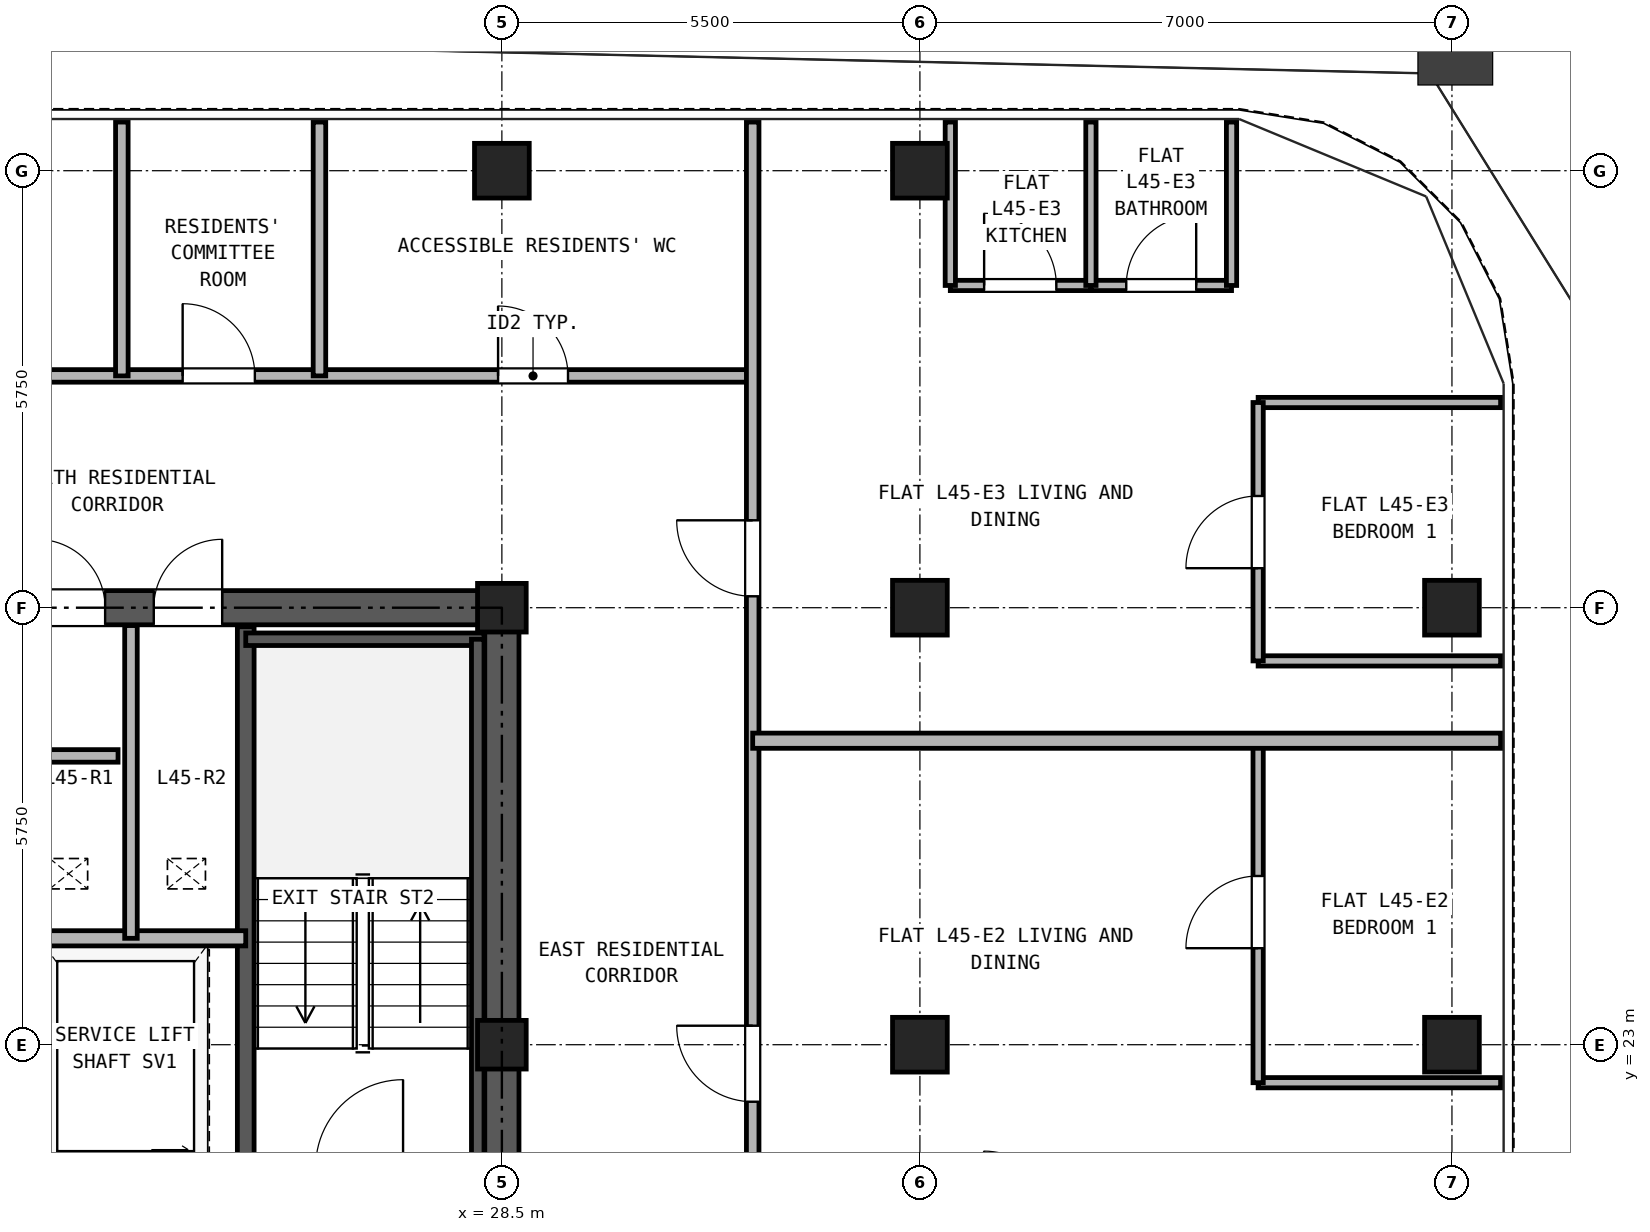
"""IFC4 building model, lengths in metres.
Left out: names, types, materials, properties, quantities, classifications, styles, units other than length and angle.
Written with IfcOpenShell. Run it as: python <this file> out.ifc"""

import sys

from ifc_helpers import new_model, si_unit, direction, frame, frame_2d, origin, origin_2d, place, context, subcontext, project, spatial, rectangle, hollow_rectangle, extrude, source, transform, mapped, element, fill, save


model = new_model("IFC4")
c1 = context("Model", 3, precision=1e-05, world=origin(), true_north=direction((0.0, 1.0)))
c2 = subcontext(c1, "Body", "Model", "MODEL_VIEW")
j1 = project(units=[si_unit("LENGTHUNIT", "METRE"), si_unit("PLANEANGLEUNIT", "RADIAN")], contexts=[c1])
p1 = place(None, origin())
s1 = spatial("IfcSite", under=j1, at=p1, CompositionType="ELEMENT")
p2 = place(p1, origin())
s2 = spatial("IfcBuilding", under=s1, at=p2, CompositionType="ELEMENT")
p3 = place(p2, frame((0.0, 0.0, 162.5)))
s3 = spatial("IfcBuildingStorey", under=s2, at=p3, CompositionType="ELEMENT", Elevation=162.5)
m1 = source(origin(), c2, "Body", "SweptSolid", [
    extrude(hollow_rectangle(XDim=0.72, YDim=0.72, WallThickness=0.04, at=origin_2d()), origin(), (0.0, 0.0, 1.0), 2.95),
])
for number, where, z_axis, x_axis in (
    (1, (28.5, 34.5, 0.0), (0.0, 0.0, 1.0), (1.0, 0.0, 0.0)),
    (2, (34.0, 34.5, 0.0), (0.0, 0.0, 1.0), (1.0, 0.0, 0.0)),
    (3, (41.0, 23.0, 0.0), (0.0, 0.0, 1.0), (1.0, 0.0, 0.0)),
    (4, (41.0, 28.75, 0.0), (0.0, 0.0, 1.0), (1.0, 0.0, 0.0)),
):
    element("IfcColumn", number, at=place(p3, frame(where, z_axis=z_axis, x_axis=x_axis)), inside=s3, PredefinedType="COLUMN", context=c2, shape_type="MappedRepresentation", body=[
        mapped(m1, transform((0.0, 0.0, 0.0), x_axis=(1.0, 0.0, 0.0), y_axis=(0.0, 1.0, 0.0), z_axis=(0.0, 0.0, 1.0), scale=1.0)),
    ])
m2 = source(origin(), c2, "Body", "SweptSolid", [
    extrude(hollow_rectangle(XDim=0.64, YDim=0.64, WallThickness=0.035, at=origin_2d()), origin(), (0.0, 0.0, 1.0), 2.95),
])
for number, where, z_axis, x_axis in (
    (5, (28.5, 23.0, 0.0), (0.0, 0.0, 1.0), (1.0, 0.0, 0.0)),
    (6, (28.5, 28.75, 0.0), (0.0, 0.0, 1.0), (1.0, 0.0, 0.0)),
):
    element("IfcColumn", number, at=place(p3, frame(where, z_axis=z_axis, x_axis=x_axis)), inside=s3, PredefinedType="COLUMN", context=c2, shape_type="MappedRepresentation", body=[
        mapped(m2, transform((0.0, 0.0, 0.0), x_axis=(1.0, 0.0, 0.0), y_axis=(0.0, 1.0, 0.0), z_axis=(0.0, 0.0, 1.0), scale=1.0)),
    ])
for number, where, z_axis, x_axis in (
    (7, (34.0, 23.0, 0.0), (0.0, 0.0, 1.0), (1.0, 0.0, 0.0)),
    (8, (34.0, 28.75, 0.0), (0.0, 0.0, 1.0), (1.0, 0.0, 0.0)),
):
    element("IfcColumn", number, at=place(p3, frame(where, z_axis=z_axis, x_axis=x_axis)), inside=s3, PredefinedType="COLUMN", context=c2, shape_type="MappedRepresentation", body=[
        mapped(m1, transform((0.0, 0.0, 0.0), x_axis=(1.0, 0.0, 0.0), y_axis=(0.0, 1.0, 0.0), z_axis=(0.0, 0.0, 1.0), scale=1.0)),
    ])
p4 = place(p3, frame((18.275, 28.75, 0.0), z_axis=(0.0, 0.0, 1.0), x_axis=(1.0, 0.0, 0.0)))
e9 = element("IfcWall", 9, at=p4, inside=s3, PredefinedType="SHEAR", context=c2, shape_type="SweptSolid", body=[
    extrude(rectangle(XDim=10.45, YDim=0.45, at=frame_2d((5.225, 0.0))), origin(), (0.0, 0.0, 1.0), 2.95),
])
p5 = place(p4, frame((4.105, 0.0, 0.0)))
e10 = element("IfcOpeningElement", 10, at=p5, cuts=e9, PredefinedType="OPENING", context=c2, shape_type="SweptSolid", body=[
    extrude(rectangle(XDim=0.9, YDim=2.05, at=frame_2d((0.45, 1.025))), frame((0.0, 0.235, 0.0), z_axis=(0.0, -1.0, 0.0), x_axis=(1.0, 0.0, 0.0)), (0.0, 0.0, 1.0), 0.47),
])
p6 = place(p4, frame((5.645, 0.0, 0.0)))
e11 = element("IfcOpeningElement", 11, at=p6, cuts=e9, PredefinedType="OPENING", context=c2, shape_type="SweptSolid", body=[
    extrude(rectangle(XDim=0.9, YDim=2.05, at=frame_2d((0.45, 1.025))), frame((0.0, 0.235, 0.0), z_axis=(0.0, -1.0, 0.0), x_axis=(1.0, 0.0, 0.0)), (0.0, 0.0, 1.0), 0.47),
])
p7 = place(p3, frame((28.5, 11.725, 0.0), z_axis=(0.0, 0.0, 1.0), x_axis=(0.0, 1.0, 0.0)))
e12 = element("IfcWall", 12, at=p7, inside=s3, PredefinedType="SHEAR", context=c2, shape_type="SweptSolid", body=[
    extrude(rectangle(XDim=16.8, YDim=0.45, at=frame_2d((8.4, 0.0))), origin(), (0.0, 0.0, 1.0), 2.95),
])
p8 = place(p7, frame((7.425, 0.0, 0.0)))
e13 = element("IfcOpeningElement", 13, at=p8, cuts=e12, PredefinedType="OPENING", context=c2, shape_type="SweptSolid", body=[
    extrude(rectangle(XDim=1.15, YDim=2.2, at=frame_2d((0.575, 1.1))), frame((0.0, 0.235, 0.0), z_axis=(0.0, -1.0, 0.0), x_axis=(1.0, 0.0, 0.0)), (0.0, 0.0, 1.0), 0.47),
])
p9 = place(p3, frame((25.13, 21.39, 0.0), z_axis=(0.0, 0.0, 1.0), x_axis=(0.0, 1.0, 0.0)))
e14 = element("IfcWall", 14, at=p9, inside=s3, PredefinedType="SOLIDWALL", context=c2, shape_type="SweptSolid", body=[
    extrude(rectangle(XDim=7.11, YDim=0.22, at=frame_2d((3.555, 0.0))), origin(), (0.0, 0.0, 1.0), 2.95),
])
p10 = place(p3, frame((25.13, 28.335, 0.0), z_axis=(0.0, 0.0, 1.0), x_axis=(1.0, 0.0, 0.0)))
e15 = element("IfcWall", 15, at=p10, inside=s3, PredefinedType="PARTITIONING", context=c2, shape_type="SweptSolid", body=[
    extrude(rectangle(XDim=3.135, YDim=0.165, at=frame_2d((1.567, 0.0))), origin(), (0.0, 0.0, 1.0), 2.95),
])
p11 = place(p3, frame((28.183, 21.39, 0.0), z_axis=(0.0, 0.0, 1.0), x_axis=(0.0, 1.0, 0.0)))
e16 = element("IfcWall", 16, at=p11, inside=s3, PredefinedType="PARTITIONING", context=c2, shape_type="SweptSolid", body=[
    extrude(rectangle(XDim=6.945, YDim=0.165, at=frame_2d((3.473, 0.0))), origin(), (0.0, 0.0, 1.0), 2.95),
])
p12 = place(p3, frame((22.11, 24.4, 0.0), z_axis=(0.0, 0.0, 1.0), x_axis=(1.0, 0.0, 0.0)))
e17 = element("IfcWall", 17, at=p12, inside=s3, PredefinedType="PARTITIONING", context=c2, shape_type="SweptSolid", body=[
    extrude(rectangle(XDim=3.02, YDim=0.2, at=frame_2d((1.51, 0.0))), origin(), (0.0, 0.0, 1.0), 2.95),
])
p13 = place(p3, frame((23.62, 24.4, 0.0), z_axis=(0.0, 0.0, 1.0), x_axis=(0.0, 1.0, 0.0)))
e18 = element("IfcWall", 18, at=p13, inside=s3, PredefinedType="PARTITIONING", context=c2, shape_type="SweptSolid", body=[
    extrude(rectangle(XDim=4.115, YDim=0.165, at=frame_2d((2.058, 0.0))), origin(), (0.0, 0.0, 1.0), 2.95),
])
p14 = place(p3, frame((15.2, 31.8, 0.0), z_axis=(0.0, 0.0, 1.0), x_axis=(1.0, 0.0, 0.0)))
e19 = element("IfcWall", 19, at=p14, inside=s3, PredefinedType="PARTITIONING", context=c2, shape_type="SweptSolid", body=[
    extrude(rectangle(XDim=16.6, YDim=0.165, at=frame_2d((8.3, 0.0))), origin(), (0.0, 0.0, 1.0), 2.583),
])
p15 = place(p14, frame((3.65, 0.0, 0.0)))
e20 = element("IfcOpeningElement", 20, at=p15, cuts=e19, PredefinedType="OPENING", context=c2, shape_type="SweptSolid", body=[
    extrude(rectangle(XDim=0.95, YDim=2.15, at=frame_2d((0.475, 1.075))), frame((0.0, 0.093, 0.0), z_axis=(0.0, -1.0, 0.0), x_axis=(1.0, 0.0, 0.0)), (0.0, 0.0, 1.0), 0.185),
])
p16 = place(p14, frame((9.1, 0.0, 0.0)))
e21 = element("IfcOpeningElement", 21, at=p16, cuts=e19, PredefinedType="OPENING", context=c2, shape_type="SweptSolid", body=[
    extrude(rectangle(XDim=0.95, YDim=2.15, at=frame_2d((0.475, 1.075))), frame((0.0, 0.093, 0.0), z_axis=(0.0, -1.0, 0.0), x_axis=(1.0, 0.0, 0.0)), (0.0, 0.0, 1.0), 0.185),
])
p17 = place(p14, frame((13.25, 0.0, 0.0)))
e22 = element("IfcOpeningElement", 22, at=p17, cuts=e19, PredefinedType="OPENING", context=c2, shape_type="SweptSolid", body=[
    extrude(rectangle(XDim=0.92, YDim=2.1, at=frame_2d((0.46, 1.05))), frame((0.0, 0.093, 0.0), z_axis=(0.0, -1.0, 0.0), x_axis=(1.0, 0.0, 0.0)), (0.0, 0.0, 1.0), 0.185),
])
p18 = place(p3, frame((31.8, 10.65, 0.0), z_axis=(0.0, 0.0, 1.0), x_axis=(0.0, 1.0, 0.0)))
e23 = element("IfcWall", 23, at=p18, inside=s3, PredefinedType="PARTITIONING", context=c2, shape_type="SweptSolid", body=[
    extrude(rectangle(XDim=24.49, YDim=0.165, at=frame_2d((12.245, 0.0))), origin(), (0.0, 0.0, 1.0), 2.95),
])
p19 = place(p18, frame((3.425, 0.0, 0.0)))
e24 = element("IfcOpeningElement", 24, at=p19, cuts=e23, PredefinedType="OPENING", context=c2, shape_type="SweptSolid", body=[
    extrude(rectangle(XDim=1.0, YDim=2.15, at=frame_2d((0.5, 1.075))), frame((0.0, 0.093, 0.0), z_axis=(0.0, -1.0, 0.0), x_axis=(1.0, 0.0, 0.0)), (0.0, 0.0, 1.0), 0.185),
])
p20 = place(p18, frame((11.6, 0.0, 0.0)))
e25 = element("IfcOpeningElement", 25, at=p20, cuts=e23, PredefinedType="OPENING", context=c2, shape_type="SweptSolid", body=[
    extrude(rectangle(XDim=1.0, YDim=2.15, at=frame_2d((0.5, 1.075))), frame((0.0, 0.093, 0.0), z_axis=(0.0, -1.0, 0.0), x_axis=(1.0, 0.0, 0.0)), (0.0, 0.0, 1.0), 0.185),
])
p21 = place(p18, frame((18.25, 0.0, 0.0)))
e26 = element("IfcOpeningElement", 26, at=p21, cuts=e23, PredefinedType="OPENING", context=c2, shape_type="SweptSolid", body=[
    extrude(rectangle(XDim=1.0, YDim=2.15, at=frame_2d((0.5, 1.075))), frame((0.0, 0.093, 0.0), z_axis=(0.0, -1.0, 0.0), x_axis=(1.0, 0.0, 0.0)), (0.0, 0.0, 1.0), 0.185),
])
p22 = place(p3, frame((38.45, 22.5, 0.0), z_axis=(0.0, 0.0, 1.0), x_axis=(1.0, 0.0, 0.0)))
e27 = element("IfcWall", 27, at=p22, inside=s3, PredefinedType="PARTITIONING", context=c2, shape_type="SweptSolid", body=[
    extrude(rectangle(XDim=3.19, YDim=0.135, at=frame_2d((1.595, 0.0))), origin(), (0.0, 0.0, 1.0), 2.95),
])
p23 = place(p3, frame((38.45, 22.5, 0.0), z_axis=(0.0, 0.0, 1.0), x_axis=(0.0, 1.0, 0.0)))
e28 = element("IfcWall", 28, at=p23, inside=s3, PredefinedType="PARTITIONING", context=c2, shape_type="SweptSolid", body=[
    extrude(rectangle(XDim=4.5, YDim=0.135, at=frame_2d((2.25, 0.0))), origin(), (0.0, 0.0, 1.0), 2.95),
])
p24 = place(p23, frame((1.77, 0.0, 0.0)))
e29 = element("IfcOpeningElement", 29, at=p24, cuts=e28, PredefinedType="OPENING", context=c2, shape_type="SweptSolid", body=[
    extrude(rectangle(XDim=0.95, YDim=2.15, at=frame_2d((0.475, 1.075))), frame((0.0, 0.077, 0.0), z_axis=(0.0, -1.0, 0.0), x_axis=(1.0, 0.0, 0.0)), (0.0, 0.0, 1.0), 0.155),
])
p25 = place(p3, frame((31.8, 27.0, 0.0), z_axis=(0.0, 0.0, 1.0), x_axis=(1.0, 0.0, 0.0)))
e30 = element("IfcWall", 30, at=p25, inside=s3, PredefinedType="PARTITIONING", context=c2, shape_type="SweptSolid", body=[
    extrude(rectangle(XDim=9.84, YDim=0.2, at=frame_2d((4.92, 0.0))), origin(), (0.0, 0.0, 1.0), 2.95),
])
p26 = place(p3, frame((34.4, 32.99, 0.0), z_axis=(0.0, 0.0, 1.0), x_axis=(1.0, 0.0, 0.0)))
e31 = element("IfcWall", 31, at=p26, inside=s3, PredefinedType="PARTITIONING", context=c2, shape_type="SweptSolid", body=[
    extrude(rectangle(XDim=1.85, YDim=0.135, at=frame_2d((0.925, 0.0))), origin(), (0.0, 0.0, 1.0), 2.95),
])
p27 = place(p26, frame((0.445, 0.0, 0.0)))
e32 = element("IfcOpeningElement", 32, at=p27, cuts=e31, PredefinedType="OPENING", context=c2, shape_type="SweptSolid", body=[
    extrude(rectangle(XDim=0.95, YDim=2.15, at=frame_2d((0.475, 1.075))), frame((0.0, 0.077, 0.0), z_axis=(0.0, -1.0, 0.0), x_axis=(1.0, 0.0, 0.0)), (0.0, 0.0, 1.0), 0.155),
])
p28 = place(p3, frame((36.25, 32.99, 0.0), z_axis=(0.0, 0.0, 1.0), x_axis=(1.0, 0.0, 0.0)))
e33 = element("IfcWall", 33, at=p28, inside=s3, PredefinedType="PARTITIONING", context=c2, shape_type="SweptSolid", body=[
    extrude(rectangle(XDim=1.85, YDim=0.135, at=frame_2d((0.925, 0.0))), origin(), (0.0, 0.0, 1.0), 2.95),
])
p29 = place(p28, frame((0.465, 0.0, 0.0)))
e34 = element("IfcOpeningElement", 34, at=p29, cuts=e33, PredefinedType="OPENING", context=c2, shape_type="SweptSolid", body=[
    extrude(rectangle(XDim=0.92, YDim=2.1, at=frame_2d((0.46, 1.05))), frame((0.0, 0.077, 0.0), z_axis=(0.0, -1.0, 0.0), x_axis=(1.0, 0.0, 0.0)), (0.0, 0.0, 1.0), 0.155),
])
for number, where, z_axis, x_axis in (
    (35, (34.4, 32.99, 0.0), (0.0, 0.0, 1.0), (0.0, 1.0, 0.0)),
    (36, (36.25, 32.99, 0.0), (0.0, 0.0, 1.0), (0.0, 1.0, 0.0)),
    (37, (38.1, 32.99, 0.0), (0.0, 0.0, 1.0), (0.0, 1.0, 0.0)),
):
    element("IfcWall", number, at=place(p3, frame(where, z_axis=z_axis, x_axis=x_axis)), inside=s3, PredefinedType="PARTITIONING", context=c2, shape_type="SweptSolid", body=[
        extrude(rectangle(XDim=2.15, YDim=0.135, at=frame_2d((1.075, 0.0))), origin(), (0.0, 0.0, 1.0), 2.95),
    ])
for number, where, z_axis, x_axis in (
    (38, (38.45, 28.05, 0.0), (0.0, 0.0, 1.0), (1.0, 0.0, 0.0)),
    (39, (38.45, 31.45, 0.0), (0.0, 0.0, 1.0), (1.0, 0.0, 0.0)),
):
    element("IfcWall", number, at=place(p3, frame(where, z_axis=z_axis, x_axis=x_axis)), inside=s3, PredefinedType="PARTITIONING", context=c2, shape_type="SweptSolid", body=[
        extrude(rectangle(XDim=3.19, YDim=0.135, at=frame_2d((1.595, 0.0))), origin(), (0.0, 0.0, 1.0), 2.95),
    ])
p30 = place(p3, frame((38.45, 28.05, 0.0), z_axis=(0.0, 0.0, 1.0), x_axis=(0.0, 1.0, 0.0)))
e40 = element("IfcWall", 40, at=p30, inside=s3, PredefinedType="PARTITIONING", context=c2, shape_type="SweptSolid", body=[
    extrude(rectangle(XDim=3.4, YDim=0.135, at=frame_2d((1.7, 0.0))), origin(), (0.0, 0.0, 1.0), 2.95),
])
p31 = place(p30, frame((1.22, 0.0, 0.0)))
e41 = element("IfcOpeningElement", 41, at=p31, cuts=e40, PredefinedType="OPENING", context=c2, shape_type="SweptSolid", body=[
    extrude(rectangle(XDim=0.95, YDim=2.15, at=frame_2d((0.475, 1.075))), frame((0.0, 0.077, 0.0), z_axis=(0.0, -1.0, 0.0), x_axis=(1.0, 0.0, 0.0)), (0.0, 0.0, 1.0), 0.155),
])
for number, where, z_axis, x_axis in (
    (42, (23.5, 31.8, 0.0), (0.0, 0.0, 1.0), (0.0, 1.0, 0.0)),
    (43, (26.1, 31.8, 0.0), (0.0, 0.0, 1.0), (0.0, 1.0, 0.0)),
):
    element("IfcWall", number, at=place(p3, frame(where, z_axis=z_axis, x_axis=x_axis)), inside=s3, PredefinedType="PARTITIONING", context=c2, shape_type="SweptSolid", body=[
        extrude(rectangle(XDim=3.34, YDim=0.165, at=frame_2d((1.67, 0.0))), origin(), (0.0, 0.0, 1.0), 2.95),
    ])
p32 = place(p3, frame((22.35, 26.8, 0.0), z_axis=(0.0, 0.0, 1.0), x_axis=(1.0, 0.0, 0.0)))
e44 = element("IfcWall", 44, at=p32, inside=s3, PredefinedType="PARTITIONING", context=c2, shape_type="SweptSolid", body=[
    extrude(rectangle(XDim=1.1, YDim=0.165, at=frame_2d((0.55, 0.0))), origin(), (0.0, 0.0, 1.0), 2.95),
])
p33 = place(p5, origin())
e45 = element("IfcDoor", 45, at=p33, inside=s3, OperationType="SINGLE_SWING_LEFT", PredefinedType="DOOR", context=c2, shape_type="SweptSolid", body=[
    extrude(rectangle(XDim=0.9, YDim=2.05, at=frame_2d((0.45, 1.025))), frame((0.0, 0.025, 0.0), z_axis=(0.0, -1.0, 0.0), x_axis=(1.0, 0.0, 0.0)), (0.0, 0.0, 1.0), 0.05),
])
fill(e10, e45)
p34 = place(p6, origin())
e46 = element("IfcDoor", 46, at=p34, inside=s3, OperationType="SINGLE_SWING_RIGHT", PredefinedType="DOOR", context=c2, shape_type="SweptSolid", body=[
    extrude(rectangle(XDim=0.9, YDim=2.05, at=frame_2d((0.45, 1.025))), frame((0.0, 0.025, 0.0), z_axis=(0.0, -1.0, 0.0), x_axis=(1.0, 0.0, 0.0)), (0.0, 0.0, 1.0), 0.05),
])
fill(e11, e46)
p35 = place(p24, frame((0.95, 0.0, 0.0), z_axis=(0.0, 0.0, 1.0), x_axis=(-1.0, 0.0, 0.0)))
e47 = element("IfcDoor", 47, at=p35, inside=s3, OperationType="SINGLE_SWING_LEFT", PredefinedType="DOOR", context=c2, shape_type="SweptSolid", body=[
    extrude(rectangle(XDim=0.95, YDim=2.15, at=frame_2d((0.475, 1.075))), frame((0.0, 0.025, 0.0), z_axis=(0.0, -1.0, 0.0), x_axis=(1.0, 0.0, 0.0)), (0.0, 0.0, 1.0), 0.05),
])
fill(e29, e47)
p36 = place(p20, frame((1.0, 0.0, 0.0), z_axis=(0.0, 0.0, 1.0), x_axis=(-1.0, 0.0, 0.0)))
e48 = element("IfcDoor", 48, at=p36, inside=s3, OperationType="SINGLE_SWING_RIGHT", PredefinedType="DOOR", context=c2, shape_type="SweptSolid", body=[
    extrude(rectangle(XDim=1.0, YDim=2.15, at=frame_2d((0.5, 1.075))), frame((0.0, 0.025, 0.0), z_axis=(0.0, -1.0, 0.0), x_axis=(1.0, 0.0, 0.0)), (0.0, 0.0, 1.0), 0.05),
])
fill(e25, e48)
p37 = place(p27, frame((0.95, 0.0, 0.0), z_axis=(0.0, 0.0, 1.0), x_axis=(-1.0, 0.0, 0.0)))
e49 = element("IfcDoor", 49, at=p37, inside=s3, OperationType="SINGLE_SWING_LEFT", PredefinedType="DOOR", context=c2, shape_type="SweptSolid", body=[
    extrude(rectangle(XDim=0.95, YDim=2.15, at=frame_2d((0.475, 1.075))), frame((0.0, 0.025, 0.0), z_axis=(0.0, -1.0, 0.0), x_axis=(1.0, 0.0, 0.0)), (0.0, 0.0, 1.0), 0.05),
])
fill(e32, e49)
p38 = place(p29, frame((0.92, 0.0, 0.0), z_axis=(0.0, 0.0, 1.0), x_axis=(-1.0, 0.0, 0.0)))
e50 = element("IfcDoor", 50, at=p38, inside=s3, OperationType="SINGLE_SWING_RIGHT", PredefinedType="DOOR", context=c2, shape_type="SweptSolid", body=[
    extrude(rectangle(XDim=0.92, YDim=2.1, at=frame_2d((0.46, 1.05))), frame((0.0, 0.025, 0.0), z_axis=(0.0, -1.0, 0.0), x_axis=(1.0, 0.0, 0.0)), (0.0, 0.0, 1.0), 0.05),
])
fill(e34, e50)
p39 = place(p31, frame((0.95, 0.0, 0.0), z_axis=(0.0, 0.0, 1.0), x_axis=(-1.0, 0.0, 0.0)))
e51 = element("IfcDoor", 51, at=p39, inside=s3, OperationType="SINGLE_SWING_LEFT", PredefinedType="DOOR", context=c2, shape_type="SweptSolid", body=[
    extrude(rectangle(XDim=0.95, YDim=2.15, at=frame_2d((0.475, 1.075))), frame((0.0, 0.025, 0.0), z_axis=(0.0, -1.0, 0.0), x_axis=(1.0, 0.0, 0.0)), (0.0, 0.0, 1.0), 0.05),
])
fill(e41, e51)
p40 = place(p21, frame((1.0, 0.0, 0.0), z_axis=(0.0, 0.0, 1.0), x_axis=(-1.0, 0.0, 0.0)))
e52 = element("IfcDoor", 52, at=p40, inside=s3, OperationType="SINGLE_SWING_RIGHT", PredefinedType="DOOR", context=c2, shape_type="SweptSolid", body=[
    extrude(rectangle(XDim=1.0, YDim=2.15, at=frame_2d((0.5, 1.075))), frame((0.0, 0.025, 0.0), z_axis=(0.0, -1.0, 0.0), x_axis=(1.0, 0.0, 0.0)), (0.0, 0.0, 1.0), 0.05),
])
fill(e26, e52)
p41 = place(p16, origin())
e53 = element("IfcDoor", 53, at=p41, inside=s3, OperationType="SINGLE_SWING_LEFT", PredefinedType="DOOR", context=c2, shape_type="SweptSolid", body=[
    extrude(rectangle(XDim=0.95, YDim=2.15, at=frame_2d((0.475, 1.075))), frame((0.0, 0.025, 0.0), z_axis=(0.0, -1.0, 0.0), x_axis=(1.0, 0.0, 0.0)), (0.0, 0.0, 1.0), 0.05),
])
fill(e21, e53)
p42 = place(p17, origin())
e54 = element("IfcDoor", 54, at=p42, inside=s3, OperationType="SINGLE_SWING_LEFT", PredefinedType="DOOR", context=c2, shape_type="SweptSolid", body=[
    extrude(rectangle(XDim=0.92, YDim=2.1, at=frame_2d((0.46, 1.05))), frame((0.0, 0.025, 0.0), z_axis=(0.0, -1.0, 0.0), x_axis=(1.0, 0.0, 0.0)), (0.0, 0.0, 1.0), 0.05),
])
fill(e22, e54)
save(model, sys.argv[1])
